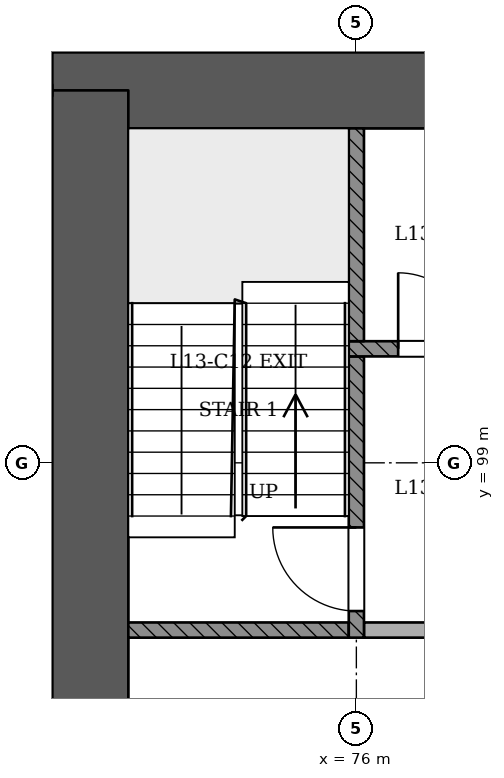
"""IFC4 building model, lengths in metres.
Left out: names, types, materials, properties, quantities, classifications, styles, units other than length and angle.
Written with IfcOpenShell. Run it as: python <this file> out.ifc"""

import sys

from ifc_helpers import new_model, si_unit, direction, frame, frame_2d, origin, place, context, subcontext, project, spatial, rectangle, extrude, element, fill, save


model = new_model("IFC4")
c1 = context("Model", 3, precision=1e-05, world=origin(), true_north=direction((0.0, 1.0)))
c2 = subcontext(c1, "Body", "Model", "MODEL_VIEW")
j1 = project(units=[si_unit("LENGTHUNIT", "METRE"), si_unit("PLANEANGLEUNIT", "RADIAN")], contexts=[c1])
p1 = place(None, origin())
s1 = spatial("IfcSite", under=j1, at=p1, CompositionType="ELEMENT")
p2 = place(p1, origin())
s2 = spatial("IfcBuilding", under=s1, at=p2, CompositionType="ELEMENT")
p3 = place(p2, frame((0.0, 0.0, 55.8)))
s3 = spatial("IfcBuildingStorey", under=s2, at=p3, CompositionType="ELEMENT", Elevation=55.8)
p4 = place(p3, frame((97.5, 103.9, 0.0), z_axis=(0.0, 0.0, 1.0), x_axis=(-1.0, 0.0, 0.0)))
e1 = element("IfcWall", 1, at=p4, inside=s3, PredefinedType="SHEAR", context=c2, shape_type="SweptSolid", body=[
    extrude(rectangle(XDim=25.5, YDim=1.0, at=frame_2d((12.75, 0.0))), origin(), (0.0, 0.0, 1.0), 3.6),
])
p5 = place(p3, frame((72.5, 103.9, 0.0), z_axis=(0.0, 0.0, 1.0), x_axis=(0.0, -1.0, 0.0)))
e2 = element("IfcWall", 2, at=p5, inside=s3, PredefinedType="SHEAR", context=c2, shape_type="SweptSolid", body=[
    extrude(rectangle(XDim=11.5, YDim=1.0, at=frame_2d((5.75, 0.0))), origin(), (0.0, 0.0, 1.0), 3.6),
])
p6 = place(p3, frame((73.0, 96.8, 0.0), z_axis=(0.0, 0.0, 1.0), x_axis=(1.0, 0.0, 0.0)))
e3 = element("IfcWall", 3, at=p6, inside=s3, PredefinedType="SOLIDWALL", context=c2, shape_type="SweptSolid", body=[
    extrude(rectangle(XDim=2.9, YDim=0.2, at=frame_2d((1.45, 0.0))), origin(), (0.0, 0.0, 1.0), 3.1),
])
p7 = place(p3, frame((76.0, 96.7, 0.0), z_axis=(0.0, 0.0, 1.0), x_axis=(0.0, 1.0, 0.0)))
e4 = element("IfcWall", 4, at=p7, inside=s3, PredefinedType="SOLIDWALL", context=c2, shape_type="SweptSolid", body=[
    extrude(rectangle(XDim=3.7, YDim=0.2, at=frame_2d((1.85, 0.0))), origin(), (0.0, 0.0, 1.0), 3.1),
])
p8 = place(p7, frame((0.35, 0.0, 0.0)))
e5 = element("IfcOpeningElement", 5, at=p8, cuts=e4, PredefinedType="OPENING", context=c2, shape_type="SweptSolid", body=[
    extrude(rectangle(XDim=1.1, YDim=2.1, at=frame_2d((0.55, 1.05))), frame((0.0, 0.11, 0.0), z_axis=(0.0, -1.0, 0.0), x_axis=(1.0, 0.0, 0.0)), (0.0, 0.0, 1.0), 0.221),
])
p9 = place(p3, frame((76.1, 96.8, 0.0), z_axis=(0.0, 0.0, 1.0), x_axis=(1.0, 0.0, 0.0)))
e6 = element("IfcWall", 6, at=p9, inside=s3, PredefinedType="PARTITIONING", context=c2, shape_type="SweptSolid", body=[
    extrude(rectangle(XDim=1.9, YDim=0.2, at=frame_2d((0.95, 0.0))), origin(), (0.0, 0.0, 1.0), 3.1),
])
p10 = place(p3, frame((75.9, 100.5, 0.0), z_axis=(0.0, 0.0, 1.0), x_axis=(1.0, 0.0, 0.0)))
e7 = element("IfcWall", 7, at=p10, inside=s3, PredefinedType="SOLIDWALL", context=c2, shape_type="SweptSolid", body=[
    extrude(rectangle(XDim=18.2, YDim=0.2, at=frame_2d((9.1, 0.0))), origin(), (0.0, 0.0, 1.0), 3.1),
])
p11 = place(p10, frame((2.6, 0.0, 0.0)))
e8 = element("IfcOpeningElement", 8, at=p11, cuts=e7, PredefinedType="OPENING", context=c2, shape_type="SweptSolid", body=[
    extrude(rectangle(XDim=1.1, YDim=2.1, at=frame_2d((0.55, 1.05))), frame((0.0, 0.11, 0.0), z_axis=(0.0, -1.0, 0.0), x_axis=(1.0, 0.0, 0.0)), (0.0, 0.0, 1.0), 0.221),
])
p12 = place(p10, frame((4.5, 0.0, 0.0)))
e9 = element("IfcOpeningElement", 9, at=p12, cuts=e7, PredefinedType="OPENING", context=c2, shape_type="SweptSolid", body=[
    extrude(rectangle(XDim=1.1, YDim=2.1, at=frame_2d((0.55, 1.05))), frame((0.0, 0.11, 0.0), z_axis=(0.0, -1.0, 0.0), x_axis=(1.0, 0.0, 0.0)), (0.0, 0.0, 1.0), 0.221),
])
p13 = place(p10, frame((6.4, 0.0, 0.0)))
e10 = element("IfcOpeningElement", 10, at=p13, cuts=e7, PredefinedType="OPENING", context=c2, shape_type="SweptSolid", body=[
    extrude(rectangle(XDim=1.1, YDim=2.1, at=frame_2d((0.55, 1.05))), frame((0.0, 0.11, 0.0), z_axis=(0.0, -1.0, 0.0), x_axis=(1.0, 0.0, 0.0)), (0.0, 0.0, 1.0), 0.221),
])
p14 = place(p10, frame((8.3, 0.0, 0.0)))
e11 = element("IfcOpeningElement", 11, at=p14, cuts=e7, PredefinedType="OPENING", context=c2, shape_type="SweptSolid", body=[
    extrude(rectangle(XDim=1.1, YDim=2.1, at=frame_2d((0.55, 1.05))), frame((0.0, 0.11, 0.0), z_axis=(0.0, -1.0, 0.0), x_axis=(1.0, 0.0, 0.0)), (0.0, 0.0, 1.0), 0.221),
])
p15 = place(p10, frame((10.2, 0.0, 0.0)))
e12 = element("IfcOpeningElement", 12, at=p15, cuts=e7, PredefinedType="OPENING", context=c2, shape_type="SweptSolid", body=[
    extrude(rectangle(XDim=1.1, YDim=2.1, at=frame_2d((0.55, 1.05))), frame((0.0, 0.11, 0.0), z_axis=(0.0, -1.0, 0.0), x_axis=(1.0, 0.0, 0.0)), (0.0, 0.0, 1.0), 0.221),
])
p16 = place(p10, frame((12.1, 0.0, 0.0)))
e13 = element("IfcOpeningElement", 13, at=p16, cuts=e7, PredefinedType="OPENING", context=c2, shape_type="SweptSolid", body=[
    extrude(rectangle(XDim=1.1, YDim=2.1, at=frame_2d((0.55, 1.05))), frame((0.0, 0.11, 0.0), z_axis=(0.0, -1.0, 0.0), x_axis=(1.0, 0.0, 0.0)), (0.0, 0.0, 1.0), 0.221),
])
p17 = place(p10, frame((14.0, 0.0, 0.0)))
e14 = element("IfcOpeningElement", 14, at=p17, cuts=e7, PredefinedType="OPENING", context=c2, shape_type="SweptSolid", body=[
    extrude(rectangle(XDim=1.1, YDim=2.1, at=frame_2d((0.55, 1.05))), frame((0.0, 0.11, 0.0), z_axis=(0.0, -1.0, 0.0), x_axis=(1.0, 0.0, 0.0)), (0.0, 0.0, 1.0), 0.221),
])
p18 = place(p10, frame((0.65, 0.0, 0.0)))
e15 = element("IfcOpeningElement", 15, at=p18, cuts=e7, PredefinedType="OPENING", context=c2, shape_type="SweptSolid", body=[
    extrude(rectangle(XDim=1.0, YDim=2.1, at=frame_2d((0.5, 1.05))), frame((0.0, 0.11, 0.0), z_axis=(0.0, -1.0, 0.0), x_axis=(1.0, 0.0, 0.0)), (0.0, 0.0, 1.0), 0.221),
])
p19 = place(p10, frame((16.3, 0.0, 0.0)))
e16 = element("IfcOpeningElement", 16, at=p19, cuts=e7, PredefinedType="OPENING", context=c2, shape_type="SweptSolid", body=[
    extrude(rectangle(XDim=1.0, YDim=2.1, at=frame_2d((0.5, 1.05))), frame((0.0, 0.11, 0.0), z_axis=(0.0, -1.0, 0.0), x_axis=(1.0, 0.0, 0.0)), (0.0, 0.0, 1.0), 0.221),
])
p20 = place(p3, frame((76.0, 100.6, 0.0), z_axis=(0.0, 0.0, 1.0), x_axis=(0.0, 1.0, 0.0)))
e17 = element("IfcWall", 17, at=p20, inside=s3, PredefinedType="SOLIDWALL", context=c2, shape_type="SweptSolid", body=[
    extrude(rectangle(XDim=2.8, YDim=0.2, at=frame_2d((1.4, 0.0))), origin(), (0.0, 0.0, 1.0), 3.1),
])
p21 = place(p8, origin())
e18 = element("IfcDoor", 18, at=p21, inside=s3, OperationType="SINGLE_SWING_RIGHT", PredefinedType="NOTDEFINED", context=c2, shape_type="SweptSolid", body=[
    extrude(rectangle(XDim=1.1, YDim=2.1, at=frame_2d((0.55, 1.05))), frame((0.0, 0.025, 0.0), z_axis=(0.0, -1.0, 0.0), x_axis=(1.0, 0.0, 0.0)), (0.0, 0.0, 1.0), 0.05),
])
fill(e5, e18)
p22 = place(p18, origin())
e19 = element("IfcDoor", 19, at=p22, inside=s3, OperationType="SINGLE_SWING_LEFT", PredefinedType="NOTDEFINED", context=c2, shape_type="SweptSolid", body=[
    extrude(rectangle(XDim=1.0, YDim=2.1, at=frame_2d((0.5, 1.05))), frame((0.0, 0.025, 0.0), z_axis=(0.0, -1.0, 0.0), x_axis=(1.0, 0.0, 0.0)), (0.0, 0.0, 1.0), 0.05),
])
fill(e15, e19)
save(model, sys.argv[1])
